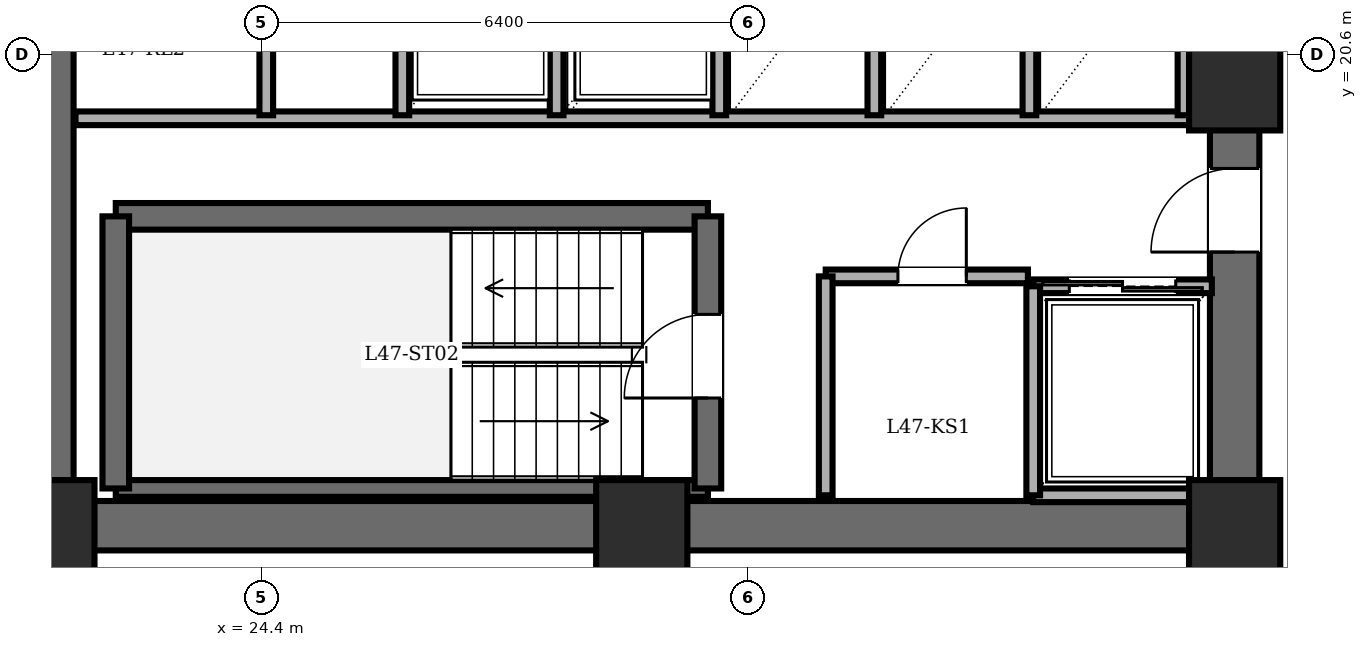
"""IFC4 building model, lengths in metres.
Left out: names, types, materials, properties, quantities, classifications, styles, units other than length and angle.
Written with IfcOpenShell. Run it as: python <this file> out.ifc"""

import sys

from ifc_helpers import new_model, si_unit, direction, frame, frame_2d, origin, origin_2d, place, context, subcontext, project, spatial, rectangle, extrude, element, fill, save


model = new_model("IFC4")
c1 = context("Model", 3, precision=1e-05, world=origin(), true_north=direction((0.0, 1.0)))
c2 = subcontext(c1, "Body", "Model", "MODEL_VIEW")
j1 = project(units=[si_unit("LENGTHUNIT", "METRE"), si_unit("PLANEANGLEUNIT", "RADIAN")], contexts=[c1])
p1 = place(None, origin())
s1 = spatial("IfcSite", under=j1, at=p1, CompositionType="ELEMENT")
p2 = place(p1, origin())
s2 = spatial("IfcBuilding", under=s1, at=p2, CompositionType="ELEMENT")
p3 = place(p2, frame((0.0, 0.0, 179.8)))
s3 = spatial("IfcBuildingStorey", under=s2, at=p3, CompositionType="ELEMENT", Elevation=179.8)
for number, where, z_axis, x_axis in (
    (1, (21.6, 14.4, 0.0), (0.0, 0.0, 1.0), (1.0, 0.0, 0.0)),
    (2, (29.4, 14.4, 0.0), (0.0, 0.0, 1.0), (1.0, 0.0, 0.0)),
    (3, (37.2, 14.4, 0.0), (0.0, 0.0, 1.0), (1.0, 0.0, 0.0)),
    (4, (37.2, 20.2, 0.0), (0.0, 0.0, 1.0), (1.0, 0.0, 0.0)),
):
    element("IfcColumn", number, at=place(p3, frame(where, z_axis=z_axis, x_axis=x_axis)), inside=s3, PredefinedType="COLUMN", context=c2, shape_type="SweptSolid", body=[
        extrude(rectangle(XDim=1.2, YDim=1.2, at=origin_2d()), origin(), (0.0, 0.0, 1.0), 3.6),
    ])
p4 = place(p3, frame((21.6, 14.4, 0.0), z_axis=(0.0, 0.0, 1.0), x_axis=(0.0, 1.0, 0.0)))
e5 = element("IfcWall", 5, at=p4, inside=s3, PredefinedType="SHEAR", context=c2, shape_type="SweptSolid", body=[
    extrude(rectangle(XDim=19.2, YDim=0.65, at=frame_2d((9.6, 0.0))), origin(), (0.0, 0.0, 1.0), 3.4),
])
p5 = place(p3, frame((37.2, 14.4, 0.0), z_axis=(0.0, 0.0, 1.0), x_axis=(-1.0, 0.0, 0.0)))
e6 = element("IfcWall", 6, at=p5, inside=s3, PredefinedType="SHEAR", context=c2, shape_type="SweptSolid", body=[
    extrude(rectangle(XDim=15.6, YDim=0.65, at=frame_2d((7.8, 0.0))), origin(), (0.0, 0.0, 1.0), 3.4),
])
p6 = place(p3, frame((37.2, 14.4, 0.0), z_axis=(0.0, 0.0, 1.0), x_axis=(0.0, 1.0, 0.0)))
e7 = element("IfcWall", 7, at=p6, inside=s3, PredefinedType="SHEAR", context=c2, shape_type="SweptSolid", body=[
    extrude(rectangle(XDim=19.2, YDim=0.65, at=frame_2d((9.6, 0.0))), origin(), (0.0, 0.0, 1.0), 3.4),
])
p7 = place(p6, frame((15.8, 0.0, 0.0)))
e8 = element("IfcOpeningElement", 8, at=p7, cuts=e7, PredefinedType="OPENING", context=c2, shape_type="SweptSolid", body=[
    extrude(rectangle(XDim=1.15, YDim=2.15, at=frame_2d((0.575, 1.075))), frame((0.0, 0.335, 0.0), z_axis=(0.0, -1.0, 0.0), x_axis=(1.0, 0.0, 0.0)), (0.0, 0.0, 1.0), 0.67),
])
p8 = place(p6, frame((3.6, 0.0, 0.0)))
e9 = element("IfcOpeningElement", 9, at=p8, cuts=e7, PredefinedType="OPENING", context=c2, shape_type="SweptSolid", body=[
    extrude(rectangle(XDim=1.1, YDim=2.15, at=frame_2d((0.55, 1.075))), frame((0.0, 0.335, 0.0), z_axis=(0.0, -1.0, 0.0), x_axis=(1.0, 0.0, 0.0)), (0.0, 0.0, 1.0), 0.67),
])
p9 = place(p6, frame((8.6, 0.0, 0.0)))
e10 = element("IfcOpeningElement", 10, at=p9, cuts=e7, PredefinedType="OPENING", context=c2, shape_type="SweptSolid", body=[
    extrude(rectangle(XDim=1.3, YDim=2.2, at=frame_2d((0.65, 1.1))), frame((0.0, 0.335, 0.0), z_axis=(0.0, -1.0, 0.0), x_axis=(1.0, 0.0, 0.0)), (0.0, 0.0, 1.0), 0.67),
])
p10 = place(p3, frame((22.48, 18.47, 0.0), z_axis=(0.0, 0.0, 1.0), x_axis=(1.0, 0.0, 0.0)))
e11 = element("IfcWall", 11, at=p10, inside=s3, PredefinedType="SOLIDWALL", context=c2, shape_type="SweptSolid", body=[
    extrude(rectangle(XDim=7.79, YDim=0.35, at=frame_2d((3.895, 0.0))), origin(), (0.0, 0.0, 1.0), 3.4),
])
p11 = place(p3, frame((22.48, 14.89, 0.0), z_axis=(0.0, 0.0, 1.0), x_axis=(1.0, 0.0, 0.0)))
e12 = element("IfcWall", 12, at=p11, inside=s3, PredefinedType="PARTITIONING", context=c2, shape_type="SweptSolid", body=[
    extrude(rectangle(XDim=7.79, YDim=0.22, at=frame_2d((3.895, 0.0))), origin(), (0.0, 0.0, 1.0), 3.4),
])
p12 = place(p3, frame((22.48, 14.89, 0.0), z_axis=(0.0, 0.0, 1.0), x_axis=(0.0, 1.0, 0.0)))
e13 = element("IfcWall", 13, at=p12, inside=s3, PredefinedType="SOLIDWALL", context=c2, shape_type="SweptSolid", body=[
    extrude(rectangle(XDim=3.58, YDim=0.35, at=frame_2d((1.79, 0.0))), origin(), (0.0, 0.0, 1.0), 3.4),
])
p13 = place(p3, frame((30.27, 14.89, 0.0), z_axis=(0.0, 0.0, 1.0), x_axis=(0.0, 1.0, 0.0)))
e14 = element("IfcWall", 14, at=p13, inside=s3, PredefinedType="SOLIDWALL", context=c2, shape_type="SweptSolid", body=[
    extrude(rectangle(XDim=3.58, YDim=0.35, at=frame_2d((1.79, 0.0))), origin(), (0.0, 0.0, 1.0), 3.4),
])
p14 = place(p13, frame((1.19, 0.0, 0.0)))
e15 = element("IfcOpeningElement", 15, at=p14, cuts=e14, PredefinedType="OPENING", context=c2, shape_type="SweptSolid", body=[
    extrude(rectangle(XDim=1.1, YDim=2.15, at=frame_2d((0.55, 1.075))), frame((0.0, 0.185, 0.0), z_axis=(0.0, -1.0, 0.0), x_axis=(1.0, 0.0, 0.0)), (0.0, 0.0, 1.0), 0.37),
])
p15 = place(p3, frame((21.95, 19.76, 0.0), z_axis=(0.0, 0.0, 1.0), x_axis=(1.0, 0.0, 0.0)))
e16 = element("IfcWall", 16, at=p15, inside=s3, PredefinedType="PARTITIONING", context=c2, shape_type="SweptSolid", body=[
    extrude(rectangle(XDim=14.87, YDim=0.18, at=frame_2d((7.435, 0.0))), origin(), (0.0, 0.0, 1.0), 3.4),
])
p16 = place(p3, frame((31.82, 17.68, 0.0), z_axis=(0.0, 0.0, 1.0), x_axis=(1.0, 0.0, 0.0)))
e17 = element("IfcWall", 17, at=p16, inside=s3, PredefinedType="PARTITIONING", context=c2, shape_type="SweptSolid", body=[
    extrude(rectangle(XDim=2.66, YDim=0.18, at=frame_2d((1.33, 0.0))), origin(), (0.0, 0.0, 1.0), 3.4),
])
p17 = place(p16, frame((0.95, 0.0, 0.0)))
e18 = element("IfcOpeningElement", 18, at=p17, cuts=e17, PredefinedType="OPENING", context=c2, shape_type="SweptSolid", body=[
    extrude(rectangle(XDim=0.9, YDim=2.05, at=frame_2d((0.45, 1.025))), frame((0.0, 0.1, 0.0), z_axis=(0.0, -1.0, 0.0), x_axis=(1.0, 0.0, 0.0)), (0.0, 0.0, 1.0), 0.2),
])
p18 = place(p3, frame((31.82, 14.8, 0.0), z_axis=(0.0, 0.0, 1.0), x_axis=(0.0, 1.0, 0.0)))
e19 = element("IfcWall", 19, at=p18, inside=s3, PredefinedType="PARTITIONING", context=c2, shape_type="SweptSolid", body=[
    extrude(rectangle(XDim=2.88, YDim=0.18, at=frame_2d((1.44, 0.0))), origin(), (0.0, 0.0, 1.0), 3.4),
])
p19 = place(p3, frame((34.55, 17.55, 0.0), z_axis=(0.0, 0.0, 1.0), x_axis=(1.0, 0.0, 0.0)))
e20 = element("IfcWall", 20, at=p19, inside=s3, PredefinedType="PARTITIONING", context=c2, shape_type="SweptSolid", body=[
    extrude(rectangle(XDim=2.35, YDim=0.18, at=frame_2d((1.175, 0.0))), origin(), (0.0, 0.0, 1.0), 3.4),
])
p20 = place(p19, frame((0.475, 0.0, 0.0)))
e21 = element("IfcOpeningElement", 21, at=p20, cuts=e20, PredefinedType="OPENING", context=c2, shape_type="SweptSolid", body=[
    extrude(rectangle(XDim=1.4, YDim=2.3, at=frame_2d((0.7, 1.15))), frame((0.0, 0.1, 0.0), z_axis=(0.0, -1.0, 0.0), x_axis=(1.0, 0.0, 0.0)), (0.0, 0.0, 1.0), 0.2),
])
p21 = place(p3, frame((36.9, 14.8, 0.0), z_axis=(0.0, 0.0, 1.0), x_axis=(-1.0, 0.0, 0.0)))
e22 = element("IfcWall", 22, at=p21, inside=s3, PredefinedType="PARTITIONING", context=c2, shape_type="SweptSolid", body=[
    extrude(rectangle(XDim=2.35, YDim=0.18, at=frame_2d((1.175, 0.0))), origin(), (0.0, 0.0, 1.0), 3.4),
])
p22 = place(p3, frame((34.55, 17.55, 0.0), z_axis=(0.0, 0.0, 1.0), x_axis=(0.0, -1.0, 0.0)))
e23 = element("IfcWall", 23, at=p22, inside=s3, PredefinedType="PARTITIONING", context=c2, shape_type="SweptSolid", body=[
    extrude(rectangle(XDim=2.75, YDim=0.18, at=frame_2d((1.375, 0.0))), origin(), (0.0, 0.0, 1.0), 3.4),
])
for number, where, z_axis, x_axis in (
    (24, (28.28, 19.8, 0.0), (0.0, 0.0, 1.0), (0.0, 1.0, 0.0)),
    (25, (30.42, 19.8, 0.0), (0.0, 0.0, 1.0), (0.0, 1.0, 0.0)),
    (26, (32.46, 19.8, 0.0), (0.0, 0.0, 1.0), (0.0, 1.0, 0.0)),
    (27, (34.5, 19.8, 0.0), (0.0, 0.0, 1.0), (0.0, 1.0, 0.0)),
    (28, (36.54, 19.8, 0.0), (0.0, 0.0, 1.0), (0.0, 1.0, 0.0)),
):
    element("IfcWall", number, at=place(p3, frame(where, z_axis=z_axis, x_axis=x_axis)), inside=s3, PredefinedType="PARTITIONING", context=c2, shape_type="SweptSolid", body=[
        extrude(rectangle(XDim=2.5, YDim=0.18, at=frame_2d((1.25, 0.0))), origin(), (0.0, 0.0, 1.0), 3.4),
    ])
p23 = place(p3, frame((24.46, 19.8, 0.0), z_axis=(0.0, 0.0, 1.0), x_axis=(0.0, 1.0, 0.0)))
e29 = element("IfcWall", 29, at=p23, inside=s3, PredefinedType="PARTITIONING", context=c2, shape_type="SweptSolid", body=[
    extrude(rectangle(XDim=3.85, YDim=0.18, at=frame_2d((1.925, 0.0))), origin(), (0.0, 0.0, 1.0), 3.4),
])
p24 = place(p23, frame((1.465, 0.0, 0.0)))
e30 = element("IfcOpeningElement", 30, at=p24, cuts=e29, PredefinedType="OPENING", context=c2, shape_type="SweptSolid", body=[
    extrude(rectangle(XDim=0.92, YDim=2.1, at=frame_2d((0.46, 1.05))), frame((0.0, 0.1, 0.0), z_axis=(0.0, -1.0, 0.0), x_axis=(1.0, 0.0, 0.0)), (0.0, 0.0, 1.0), 0.2),
])
p25 = place(p3, frame((26.25, 19.8, 0.0), z_axis=(0.0, 0.0, 1.0), x_axis=(0.0, 1.0, 0.0)))
e31 = element("IfcWall", 31, at=p25, inside=s3, PredefinedType="PARTITIONING", context=c2, shape_type="SweptSolid", body=[
    extrude(rectangle(XDim=2.55, YDim=0.18, at=frame_2d((1.275, 0.0))), origin(), (0.0, 0.0, 1.0), 3.4),
])
p26 = place(p14, origin())
e32 = element("IfcDoor", 32, at=p26, inside=s3, OperationType="SINGLE_SWING_LEFT", PredefinedType="DOOR", context=c2, shape_type="SweptSolid", body=[
    extrude(rectangle(XDim=1.1, YDim=2.15, at=frame_2d((0.55, 1.075))), frame((0.0, 0.025, 0.0), z_axis=(0.0, -1.0, 0.0), x_axis=(1.0, 0.0, 0.0)), (0.0, 0.0, 1.0), 0.05),
])
fill(e15, e32)
p27 = place(p8, origin())
e33 = element("IfcDoor", 33, at=p27, inside=s3, OperationType="SINGLE_SWING_LEFT", PredefinedType="DOOR", context=c2, shape_type="SweptSolid", body=[
    extrude(rectangle(XDim=1.1, YDim=2.15, at=frame_2d((0.55, 1.075))), frame((0.0, 0.025, 0.0), z_axis=(0.0, -1.0, 0.0), x_axis=(1.0, 0.0, 0.0)), (0.0, 0.0, 1.0), 0.05),
])
fill(e9, e33)
p28 = place(p17, origin())
e34 = element("IfcDoor", 34, at=p28, inside=s3, OperationType="SINGLE_SWING_RIGHT", PredefinedType="DOOR", context=c2, shape_type="SweptSolid", body=[
    extrude(rectangle(XDim=0.9, YDim=2.05, at=frame_2d((0.45, 1.025))), frame((0.0, 0.025, 0.0), z_axis=(0.0, -1.0, 0.0), x_axis=(1.0, 0.0, 0.0)), (0.0, 0.0, 1.0), 0.05),
])
fill(e18, e34)
p29 = place(p20, origin())
e35 = element("IfcDoor", 35, at=p29, inside=s3, OperationType="DOUBLE_DOOR_SLIDING", PredefinedType="DOOR", context=c2, shape_type="SweptSolid", body=[
    extrude(rectangle(XDim=1.4, YDim=2.3, at=frame_2d((0.7, 1.15))), frame((0.0, 0.025, 0.0), z_axis=(0.0, -1.0, 0.0), x_axis=(1.0, 0.0, 0.0)), (0.0, 0.0, 1.0), 0.05),
])
fill(e21, e35)
save(model, sys.argv[1])
